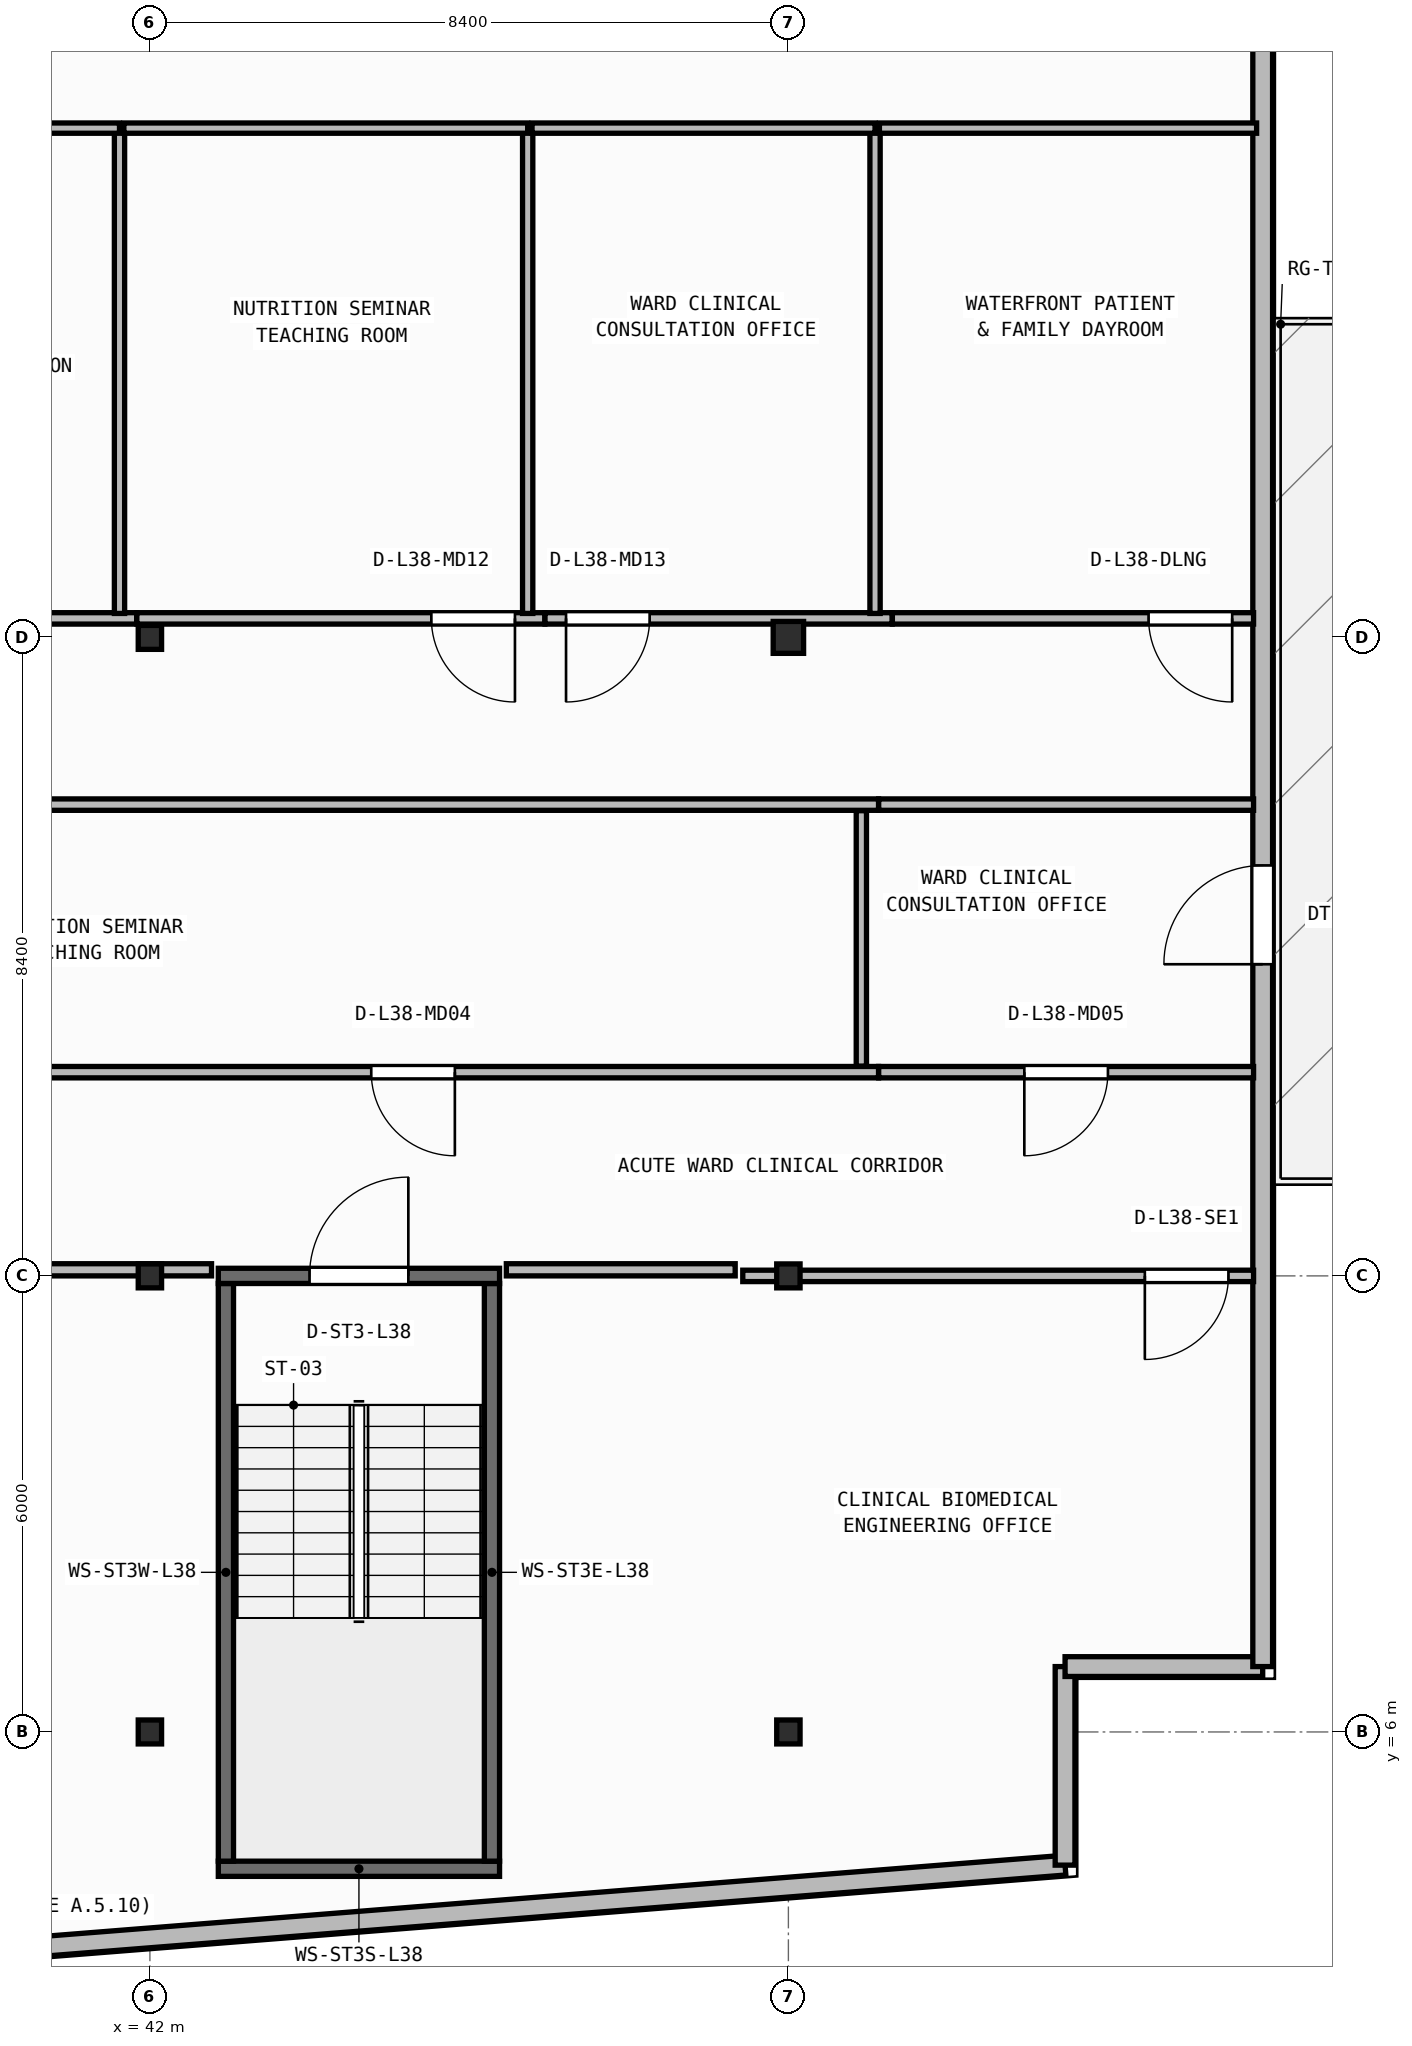
"""IFC4 building model, lengths in metres.
Left out: names, types, materials, properties, quantities, classifications, styles, units other than length and angle.
Written with IfcOpenShell. Run it as: python <this file> out.ifc"""

import sys

from ifc_helpers import new_model, si_unit, direction, frame, frame_2d, origin, origin_2d, place, context, subcontext, project, spatial, rectangle, i_section, extrude, element, fill, save


model = new_model("IFC4")
c1 = context("Model", 3, precision=1e-05, world=origin(), true_north=direction((0.0, 1.0)))
c2 = subcontext(c1, "Body", "Model", "MODEL_VIEW")
j1 = project(units=[si_unit("LENGTHUNIT", "METRE"), si_unit("PLANEANGLEUNIT", "RADIAN")], contexts=[c1])
p1 = place(None, origin())
s1 = spatial("IfcSite", under=j1, at=p1, CompositionType="ELEMENT")
p2 = place(p1, origin())
s2 = spatial("IfcBuilding", under=s1, at=p2, CompositionType="ELEMENT")
p3 = place(p2, frame((0.0, 0.0, 154.7)))
s3 = spatial("IfcBuildingStorey", under=s2, at=p3, CompositionType="ELEMENT", Elevation=154.7)
for number, where, z_axis, x_axis in (
    (1, (42.0, 6.0, 0.0), (0.0, 0.0, 1.0), (1.0, 0.0, 0.0)),
    (2, (50.4, 6.0, 0.0), (0.0, 0.0, 1.0), (1.0, 0.0, 0.0)),
    (3, (42.0, 12.0, 0.0), (0.0, 0.0, 1.0), (1.0, 0.0, 0.0)),
    (4, (50.4, 12.0, 0.0), (0.0, 0.0, 1.0), (1.0, 0.0, 0.0)),
    (5, (42.0, 20.4, 0.0), (0.0, 0.0, 1.0), (1.0, 0.0, 0.0)),
):
    element("IfcColumn", number, at=place(p3, frame(where, z_axis=z_axis, x_axis=x_axis)), inside=s3, PredefinedType="COLUMN", context=c2, shape_type="SweptSolid", body=[
        extrude(i_section(OverallWidth=0.307, OverallDepth=0.315, WebThickness=0.012, FlangeThickness=0.019, FilletRadius=0.017, at=origin_2d()), origin(), (0.0, 0.0, 1.0), 3.95),
    ])
p4 = place(p3, frame((50.4, 20.4, 0.0), z_axis=(0.0, 0.0, 1.0), x_axis=(1.0, 0.0, 0.0)))
e6 = element("IfcColumn", 6, at=p4, inside=s3, PredefinedType="COLUMN", context=c2, shape_type="SweptSolid", body=[
    extrude(i_section(OverallWidth=0.4, OverallDepth=0.42, WebThickness=0.025, FlangeThickness=0.04, at=origin_2d()), origin(), (0.0, 0.0, 1.0), 3.95),
])
p5 = place(p3, frame((2.76, 0.173, 0.0), z_axis=(0.0, 0.0, 1.0), x_axis=(0.996857931723, 0.079210251617, 0.0)))
e7 = element("IfcWall", 7, at=p5, inside=s3, PredefinedType="STANDARD", context=c2, shape_type="SweptSolid", body=[
    extrude(rectangle(XDim=51.442, YDim=0.26, at=frame_2d((25.721, 0.0))), origin(), (0.0, 0.0, 1.0), 3.71),
])
p6 = place(p5, frame((24.521, 0.0, 0.9)))
e8 = element("IfcOpeningElement", 8, at=p6, cuts=e7, PredefinedType="OPENING", context=c2, shape_type="SweptSolid", body=[
    extrude(rectangle(XDim=2.4, YDim=1.65, at=frame_2d((1.2, 0.825))), frame((0.0, 0.14, 0.0), z_axis=(0.0, -1.0, 0.0), x_axis=(1.0, 0.0, 0.0)), (0.0, 0.0, 1.0), 0.28),
])
p7 = place(p3, frame((54.04, 4.248, 0.0), z_axis=(0.0, 0.0, 1.0), x_axis=(0.0, 1.0, 0.0)))
e9 = element("IfcWall", 9, at=p7, inside=s3, PredefinedType="STANDARD", context=c2, shape_type="SweptSolid", body=[
    extrude(rectangle(XDim=2.612, YDim=0.26, at=frame_2d((1.306, 0.0))), origin(), (0.0, 0.0, 1.0), 3.71),
])
p8 = place(p3, frame((54.04, 6.86, 0.0), z_axis=(0.0, 0.0, 1.0), x_axis=(1.0, 0.0, 0.0)))
e10 = element("IfcWall", 10, at=p8, inside=s3, PredefinedType="STANDARD", context=c2, shape_type="SweptSolid", body=[
    extrude(rectangle(XDim=2.6, YDim=0.26, at=frame_2d((1.3, 0.0))), origin(), (0.0, 0.0, 1.0), 3.71),
])
p9 = place(p3, frame((56.64, 6.86, 0.0), z_axis=(0.0, 0.0, 1.0), x_axis=(0.0, 1.0, 0.0)))
e11 = element("IfcWall", 11, at=p9, inside=s3, PredefinedType="STANDARD", context=c2, shape_type="SweptSolid", body=[
    extrude(rectangle(XDim=23.48, YDim=0.26, at=frame_2d((11.74, 0.0))), origin(), (0.0, 0.0, 1.0), 3.71),
])
p10 = place(p9, frame((9.24, 0.0, 0.0)))
e12 = element("IfcOpeningElement", 12, at=p10, cuts=e11, PredefinedType="OPENING", context=c2, shape_type="SweptSolid", body=[
    extrude(rectangle(XDim=1.3, YDim=2.15, at=frame_2d((0.65, 1.075))), frame((0.0, 0.14, 0.0), z_axis=(0.0, -1.0, 0.0), x_axis=(1.0, 0.0, 0.0)), (0.0, 0.0, 1.0), 0.28),
])
p11 = place(p3, frame((42.9, 4.2, 0.0), z_axis=(0.0, 0.0, 1.0), x_axis=(1.0, 0.0, 0.0)))
e13 = element("IfcWall", 13, at=p11, inside=s3, PredefinedType="SHEAR", context=c2, shape_type="SweptSolid", body=[
    extrude(rectangle(XDim=3.7, YDim=0.2, at=frame_2d((1.85, 0.0))), origin(), (0.0, 0.0, 1.0), 3.71),
])
for number, where, z_axis, x_axis in (
    (14, (43.0, 4.3, 0.0), (0.0, 0.0, 1.0), (0.0, 1.0, 0.0)),
    (15, (46.5, 4.3, 0.0), (0.0, 0.0, 1.0), (0.0, 1.0, 0.0)),
):
    element("IfcWall", number, at=place(p3, frame(where, z_axis=z_axis, x_axis=x_axis)), inside=s3, PredefinedType="SHEAR", context=c2, shape_type="SweptSolid", body=[
        extrude(rectangle(XDim=7.6, YDim=0.2, at=frame_2d((3.8, 0.0))), origin(), (0.0, 0.0, 1.0), 3.71),
    ])
p12 = place(p3, frame((42.9, 12.0, 0.0), z_axis=(0.0, 0.0, 1.0), x_axis=(1.0, 0.0, 0.0)))
e16 = element("IfcWall", 16, at=p12, inside=s3, PredefinedType="SHEAR", context=c2, shape_type="SweptSolid", body=[
    extrude(rectangle(XDim=3.7, YDim=0.2, at=frame_2d((1.85, 0.0))), origin(), (0.0, 0.0, 1.0), 3.71),
])
p13 = place(p12, frame((1.2, 0.0, 0.0)))
e17 = element("IfcOpeningElement", 17, at=p13, cuts=e16, PredefinedType="OPENING", context=c2, shape_type="SweptSolid", body=[
    extrude(rectangle(XDim=1.3, YDim=2.15, at=frame_2d((0.65, 1.075))), frame((0.0, 0.11, 0.0), z_axis=(0.0, -1.0, 0.0), x_axis=(1.0, 0.0, 0.0)), (0.0, 0.0, 1.0), 0.22),
])
p14 = place(p3, frame((56.52, 12.0, 0.0), z_axis=(0.0, 0.0, 1.0), x_axis=(-1.0, 0.0, 0.0)))
e18 = element("IfcWall", 18, at=p14, inside=s3, PredefinedType="PARTITIONING", context=c2, shape_type="SweptSolid", body=[
    extrude(rectangle(XDim=6.72, YDim=0.15, at=frame_2d((3.36, 0.0))), origin(), (0.0, 0.0, 1.0), 3.083),
])
p15 = place(p14, frame((0.331, 0.0, 0.0)))
e19 = element("IfcOpeningElement", 19, at=p15, cuts=e18, PredefinedType="OPENING", context=c2, shape_type="SweptSolid", body=[
    extrude(rectangle(XDim=1.1, YDim=2.1, at=frame_2d((0.55, 1.05))), frame((0.0, 0.085, 0.0), z_axis=(0.0, -1.0, 0.0), x_axis=(1.0, 0.0, 0.0)), (0.0, 0.0, 1.0), 0.17),
])
p16 = place(p3, frame((51.586, 14.68, 0.0), z_axis=(0.0, 0.0, 1.0), x_axis=(-1.0, 0.0, 0.0)))
e20 = element("IfcWall", 20, at=p16, inside=s3, PredefinedType="PARTITIONING", context=c2, shape_type="SweptSolid", body=[
    extrude(rectangle(XDim=12.248, YDim=0.15, at=frame_2d((6.124, 0.0))), origin(), (0.0, 0.0, 1.0), 3.71),
])
p17 = place(p16, frame((5.574, 0.0, 0.0)))
e21 = element("IfcOpeningElement", 21, at=p17, cuts=e20, PredefinedType="OPENING", context=c2, shape_type="SweptSolid", body=[
    extrude(rectangle(XDim=1.1, YDim=2.1, at=frame_2d((0.55, 1.05))), frame((0.0, 0.085, 0.0), z_axis=(0.0, -1.0, 0.0), x_axis=(1.0, 0.0, 0.0)), (0.0, 0.0, 1.0), 0.17),
])
p18 = place(p3, frame((56.52, 14.68, 0.0), z_axis=(0.0, 0.0, 1.0), x_axis=(-1.0, 0.0, 0.0)))
e22 = element("IfcWall", 22, at=p18, inside=s3, PredefinedType="PARTITIONING", context=c2, shape_type="SweptSolid", body=[
    extrude(rectangle(XDim=4.932, YDim=0.15, at=frame_2d((2.466, 0.0))), origin(), (0.0, 0.0, 1.0), 3.71),
])
p19 = place(p18, frame((1.916, 0.0, 0.0)))
e23 = element("IfcOpeningElement", 23, at=p19, cuts=e22, PredefinedType="OPENING", context=c2, shape_type="SweptSolid", body=[
    extrude(rectangle(XDim=1.1, YDim=2.1, at=frame_2d((0.55, 1.05))), frame((0.0, 0.085, 0.0), z_axis=(0.0, -1.0, 0.0), x_axis=(1.0, 0.0, 0.0)), (0.0, 0.0, 1.0), 0.17),
])
p20 = place(p3, frame((39.338, 18.2, 0.0), z_axis=(0.0, 0.0, 1.0), x_axis=(1.0, 0.0, 0.0)))
e24 = element("IfcWall", 24, at=p20, inside=s3, PredefinedType="PARTITIONING", context=c2, shape_type="SweptSolid", body=[
    extrude(rectangle(XDim=12.248, YDim=0.15, at=frame_2d((6.124, 0.0))), origin(), (0.0, 0.0, 1.0), 3.71),
])
p21 = place(p3, frame((51.588, 18.2, 0.0), z_axis=(0.0, 0.0, 1.0), x_axis=(1.0, 0.0, 0.0)))
e25 = element("IfcWall", 25, at=p21, inside=s3, PredefinedType="PARTITIONING", context=c2, shape_type="SweptSolid", body=[
    extrude(rectangle(XDim=4.932, YDim=0.15, at=frame_2d((2.466, 0.0))), origin(), (0.0, 0.0, 1.0), 3.71),
])
p22 = place(p3, frame((41.826, 20.65, 0.0), z_axis=(0.0, 0.0, 1.0), x_axis=(-1.0, 0.0, 0.0)))
e26 = element("IfcWall", 26, at=p22, inside=s3, PredefinedType="PARTITIONING", context=c2, shape_type="SweptSolid", body=[
    extrude(rectangle(XDim=4.968, YDim=0.15, at=frame_2d((2.484, 0.0))), origin(), (0.0, 0.0, 1.0), 3.083),
])
p23 = place(p22, frame((3.581, 0.0, 0.0)))
e27 = element("IfcOpeningElement", 27, at=p23, cuts=e26, PredefinedType="OPENING", context=c2, shape_type="SweptSolid", body=[
    extrude(rectangle(XDim=1.1, YDim=2.1, at=frame_2d((0.55, 1.05))), frame((0.0, 0.085, 0.0), z_axis=(0.0, -1.0, 0.0), x_axis=(1.0, 0.0, 0.0)), (0.0, 0.0, 1.0), 0.17),
])
p24 = place(p3, frame((47.196, 20.65, 0.0), z_axis=(0.0, 0.0, 1.0), x_axis=(-1.0, 0.0, 0.0)))
e28 = element("IfcWall", 28, at=p24, inside=s3, PredefinedType="PARTITIONING", context=c2, shape_type="SweptSolid", body=[
    extrude(rectangle(XDim=5.368, YDim=0.15, at=frame_2d((2.684, 0.0))), origin(), (0.0, 0.0, 1.0), 3.083),
])
p25 = place(p24, frame((0.393, 0.0, 0.0)))
e29 = element("IfcOpeningElement", 29, at=p25, cuts=e28, PredefinedType="OPENING", context=c2, shape_type="SweptSolid", body=[
    extrude(rectangle(XDim=1.1, YDim=2.1, at=frame_2d((0.55, 1.05))), frame((0.0, 0.085, 0.0), z_axis=(0.0, -1.0, 0.0), x_axis=(1.0, 0.0, 0.0)), (0.0, 0.0, 1.0), 0.17),
])
p26 = place(p3, frame((51.766, 20.65, 0.0), z_axis=(0.0, 0.0, 1.0), x_axis=(-1.0, 0.0, 0.0)))
e30 = element("IfcWall", 30, at=p26, inside=s3, PredefinedType="PARTITIONING", context=c2, shape_type="SweptSolid", body=[
    extrude(rectangle(XDim=4.568, YDim=0.15, at=frame_2d((2.284, 0.0))), origin(), (0.0, 0.0, 1.0), 3.083),
])
p27 = place(p26, frame((3.191, 0.0, 0.0)))
e31 = element("IfcOpeningElement", 31, at=p27, cuts=e30, PredefinedType="OPENING", context=c2, shape_type="SweptSolid", body=[
    extrude(rectangle(XDim=1.1, YDim=2.1, at=frame_2d((0.55, 1.05))), frame((0.0, 0.085, 0.0), z_axis=(0.0, -1.0, 0.0), x_axis=(1.0, 0.0, 0.0)), (0.0, 0.0, 1.0), 0.17),
])
p28 = place(p3, frame((56.52, 20.65, 0.0), z_axis=(0.0, 0.0, 1.0), x_axis=(-1.0, 0.0, 0.0)))
e32 = element("IfcWall", 32, at=p28, inside=s3, PredefinedType="PARTITIONING", context=c2, shape_type="SweptSolid", body=[
    extrude(rectangle(XDim=4.752, YDim=0.15, at=frame_2d((2.376, 0.0))), origin(), (0.0, 0.0, 1.0), 3.71),
])
p29 = place(p28, frame((0.281, 0.0, 0.0)))
e33 = element("IfcOpeningElement", 33, at=p29, cuts=e32, PredefinedType="OPENING", context=c2, shape_type="SweptSolid", body=[
    extrude(rectangle(XDim=1.1, YDim=2.1, at=frame_2d((0.55, 1.05))), frame((0.0, 0.085, 0.0), z_axis=(0.0, -1.0, 0.0), x_axis=(1.0, 0.0, 0.0)), (0.0, 0.0, 1.0), 0.17),
])
p30 = place(p3, frame((51.36, 14.76, 0.0), z_axis=(0.0, 0.0, 1.0), x_axis=(0.0, 1.0, 0.0)))
e34 = element("IfcWall", 34, at=p30, inside=s3, PredefinedType="PARTITIONING", context=c2, shape_type="SweptSolid", body=[
    extrude(rectangle(XDim=3.36, YDim=0.135, at=frame_2d((1.68, 0.0))), origin(), (0.0, 0.0, 1.0), 3.71),
])
p31 = place(p3, frame((41.6, 20.715, 0.0), z_axis=(0.0, 0.0, 1.0), x_axis=(0.0, 1.0, 0.0)))
e35 = element("IfcWall", 35, at=p31, inside=s3, PredefinedType="PARTITIONING", context=c2, shape_type="SweptSolid", body=[
    extrude(rectangle(XDim=6.385, YDim=0.135, at=frame_2d((3.192, 0.0))), origin(), (0.0, 0.0, 1.0), 3.152),
])
p32 = place(p3, frame((41.6, 27.1, 0.0), z_axis=(0.0, 0.0, 1.0), x_axis=(-1.0, 0.0, 0.0)))
e36 = element("IfcWall", 36, at=p32, inside=s3, PredefinedType="PARTITIONING", context=c2, shape_type="SweptSolid", body=[
    extrude(rectangle(XDim=4.913, YDim=0.135, at=frame_2d((2.456, 0.0))), origin(), (0.0, 0.0, 1.0), 3.71),
])
p33 = place(p32, frame((2.845, 0.0, 0.0)))
e37 = element("IfcOpeningElement", 37, at=p33, cuts=e36, PredefinedType="OPENING", context=c2, shape_type="SweptSolid", body=[
    extrude(rectangle(XDim=1.1, YDim=2.1, at=frame_2d((0.55, 1.05))), frame((0.0, 0.077, 0.0), z_axis=(0.0, -1.0, 0.0), x_axis=(1.0, 0.0, 0.0)), (0.0, 0.0, 1.0), 0.155),
])
p34 = place(p3, frame((46.97, 20.715, 0.0), z_axis=(0.0, 0.0, 1.0), x_axis=(0.0, 1.0, 0.0)))
e38 = element("IfcWall", 38, at=p34, inside=s3, PredefinedType="PARTITIONING", context=c2, shape_type="SweptSolid", body=[
    extrude(rectangle(XDim=6.385, YDim=0.135, at=frame_2d((3.192, 0.0))), origin(), (0.0, 0.0, 1.0), 3.71),
])
p35 = place(p3, frame((46.97, 27.1, 0.0), z_axis=(0.0, 0.0, 1.0), x_axis=(-1.0, 0.0, 0.0)))
e39 = element("IfcWall", 39, at=p35, inside=s3, PredefinedType="PARTITIONING", context=c2, shape_type="SweptSolid", body=[
    extrude(rectangle(XDim=5.312, YDim=0.135, at=frame_2d((2.656, 0.0))), origin(), (0.0, 0.0, 1.0), 3.71),
])
p36 = place(p3, frame((51.54, 20.715, 0.0), z_axis=(0.0, 0.0, 1.0), x_axis=(0.0, 1.0, 0.0)))
e40 = element("IfcWall", 40, at=p36, inside=s3, PredefinedType="PARTITIONING", context=c2, shape_type="SweptSolid", body=[
    extrude(rectangle(XDim=6.385, YDim=0.135, at=frame_2d((3.192, 0.0))), origin(), (0.0, 0.0, 1.0), 3.71),
])
p37 = place(p3, frame((51.54, 27.1, 0.0), z_axis=(0.0, 0.0, 1.0), x_axis=(-1.0, 0.0, 0.0)))
e41 = element("IfcWall", 41, at=p37, inside=s3, PredefinedType="PARTITIONING", context=c2, shape_type="SweptSolid", body=[
    extrude(rectangle(XDim=4.512, YDim=0.135, at=frame_2d((2.256, 0.0))), origin(), (0.0, 0.0, 1.0), 3.71),
])
p38 = place(p3, frame((56.56, 27.1, 0.0), z_axis=(0.0, 0.0, 1.0), x_axis=(-1.0, 0.0, 0.0)))
e42 = element("IfcWall", 42, at=p38, inside=s3, PredefinedType="PARTITIONING", context=c2, shape_type="SweptSolid", body=[
    extrude(rectangle(XDim=4.963, YDim=0.135, at=frame_2d((2.481, 0.0))), origin(), (0.0, 0.0, 1.0), 3.71),
])
p39 = place(p3, frame((40.03, 12.08, 0.0), z_axis=(0.0, 0.0, 1.0), x_axis=(1.0, 0.0, 0.0)))
e43 = element("IfcWall", 43, at=p39, inside=s3, PredefinedType="PARTITIONING", context=c2, shape_type="SweptSolid", body=[
    extrude(rectangle(XDim=2.781, YDim=0.16, at=frame_2d((1.39, 0.0))), origin(), (0.0, 0.0, 1.0), 3.083),
])
p40 = place(p3, frame((46.689, 12.08, 0.0), z_axis=(0.0, 0.0, 1.0), x_axis=(1.0, 0.0, 0.0)))
e44 = element("IfcWall", 44, at=p40, inside=s3, PredefinedType="PARTITIONING", context=c2, shape_type="SweptSolid", body=[
    extrude(rectangle(XDim=3.011, YDim=0.16, at=frame_2d((1.505, 0.0))), origin(), (0.0, 0.0, 1.0), 3.083),
])
p41 = place(p10, origin())
e45 = element("IfcDoor", 45, at=p41, inside=s3, OperationType="SINGLE_SWING_LEFT", PredefinedType="DOOR", context=c2, shape_type="SweptSolid", body=[
    extrude(rectangle(XDim=1.3, YDim=2.15, at=frame_2d((0.65, 1.075))), frame((0.0, 0.025, 0.0), z_axis=(0.0, -1.0, 0.0), x_axis=(1.0, 0.0, 0.0)), (0.0, 0.0, 1.0), 0.05),
])
fill(e12, e45)
p42 = place(p13, origin())
e46 = element("IfcDoor", 46, at=p42, inside=s3, OperationType="SINGLE_SWING_RIGHT", PredefinedType="DOOR", context=c2, shape_type="SweptSolid", body=[
    extrude(rectangle(XDim=1.3, YDim=2.15, at=frame_2d((0.65, 1.075))), frame((0.0, 0.025, 0.0), z_axis=(0.0, -1.0, 0.0), x_axis=(1.0, 0.0, 0.0)), (0.0, 0.0, 1.0), 0.05),
])
fill(e17, e46)
p43 = place(p15, origin())
e47 = element("IfcDoor", 47, at=p43, inside=s3, OperationType="SINGLE_SWING_RIGHT", PredefinedType="DOOR", context=c2, shape_type="SweptSolid", body=[
    extrude(rectangle(XDim=1.1, YDim=2.1, at=frame_2d((0.55, 1.05))), frame((0.0, 0.025, 0.0), z_axis=(0.0, -1.0, 0.0), x_axis=(1.0, 0.0, 0.0)), (0.0, 0.0, 1.0), 0.05),
])
fill(e19, e47)
p44 = place(p17, origin())
e48 = element("IfcDoor", 48, at=p44, inside=s3, OperationType="SINGLE_SWING_LEFT", PredefinedType="DOOR", context=c2, shape_type="SweptSolid", body=[
    extrude(rectangle(XDim=1.1, YDim=2.1, at=frame_2d((0.55, 1.05))), frame((0.0, 0.025, 0.0), z_axis=(0.0, -1.0, 0.0), x_axis=(1.0, 0.0, 0.0)), (0.0, 0.0, 1.0), 0.05),
])
fill(e21, e48)
p45 = place(p19, origin())
e49 = element("IfcDoor", 49, at=p45, inside=s3, OperationType="SINGLE_SWING_RIGHT", PredefinedType="DOOR", context=c2, shape_type="SweptSolid", body=[
    extrude(rectangle(XDim=1.1, YDim=2.1, at=frame_2d((0.55, 1.05))), frame((0.0, 0.025, 0.0), z_axis=(0.0, -1.0, 0.0), x_axis=(1.0, 0.0, 0.0)), (0.0, 0.0, 1.0), 0.05),
])
fill(e23, e49)
p46 = place(p25, origin())
e50 = element("IfcDoor", 50, at=p46, inside=s3, OperationType="SINGLE_SWING_LEFT", PredefinedType="DOOR", context=c2, shape_type="SweptSolid", body=[
    extrude(rectangle(XDim=1.1, YDim=2.1, at=frame_2d((0.55, 1.05))), frame((0.0, 0.025, 0.0), z_axis=(0.0, -1.0, 0.0), x_axis=(1.0, 0.0, 0.0)), (0.0, 0.0, 1.0), 0.05),
])
fill(e29, e50)
p47 = place(p27, origin())
e51 = element("IfcDoor", 51, at=p47, inside=s3, OperationType="SINGLE_SWING_RIGHT", PredefinedType="DOOR", context=c2, shape_type="SweptSolid", body=[
    extrude(rectangle(XDim=1.1, YDim=2.1, at=frame_2d((0.55, 1.05))), frame((0.0, 0.025, 0.0), z_axis=(0.0, -1.0, 0.0), x_axis=(1.0, 0.0, 0.0)), (0.0, 0.0, 1.0), 0.05),
])
fill(e31, e51)
p48 = place(p29, origin())
e52 = element("IfcDoor", 52, at=p48, inside=s3, OperationType="SINGLE_SWING_LEFT", PredefinedType="DOOR", context=c2, shape_type="SweptSolid", body=[
    extrude(rectangle(XDim=1.1, YDim=2.1, at=frame_2d((0.55, 1.05))), frame((0.0, 0.025, 0.0), z_axis=(0.0, -1.0, 0.0), x_axis=(1.0, 0.0, 0.0)), (0.0, 0.0, 1.0), 0.05),
])
fill(e33, e52)
save(model, sys.argv[1])
